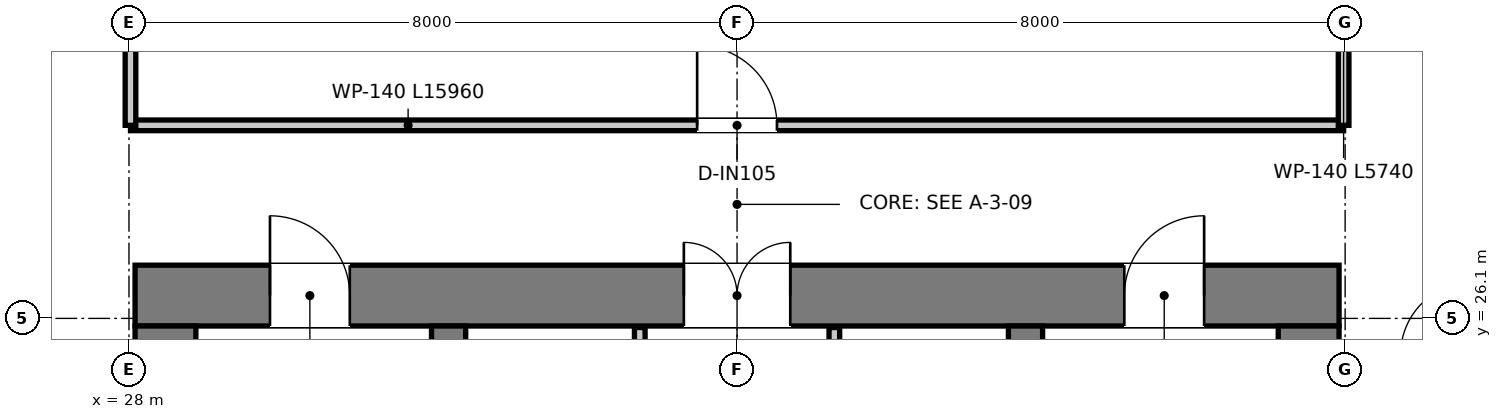
"""IFC4 building model, lengths in metres.
Left out: names, types, materials, properties, quantities, classifications, styles, units other than length and angle.
Written with IfcOpenShell. Run it as: python <this file> out.ifc"""

import sys

from ifc_helpers import new_model, si_unit, direction, frame, frame_2d, origin, place, context, subcontext, project, spatial, rectangle, extrude, element, fill, save


model = new_model("IFC4")
c1 = context("Model", 3, precision=1e-05, world=origin(), true_north=direction((0.0, 1.0)))
c2 = subcontext(c1, "Body", "Model", "MODEL_VIEW")
j1 = project(units=[si_unit("LENGTHUNIT", "METRE"), si_unit("PLANEANGLEUNIT", "RADIAN")], contexts=[c1])
p1 = place(None, origin())
s1 = spatial("IfcSite", under=j1, at=p1, CompositionType="ELEMENT")
p2 = place(p1, origin())
s2 = spatial("IfcBuilding", under=s1, at=p2, CompositionType="ELEMENT")
p3 = place(p2, frame((0.0, 0.0, 86.1)))
s3 = spatial("IfcBuildingStorey", under=s2, at=p3, CompositionType="ELEMENT", Elevation=86.1)
p4 = place(p3, frame((28.08, 26.4, 0.0), z_axis=(0.0, 0.0, 1.0), x_axis=(1.0, 0.0, 0.0)))
e1 = element("IfcWall", 1, at=p4, inside=s3, PredefinedType="SHEAR", context=c2, shape_type="SweptSolid", body=[
    extrude(rectangle(XDim=15.84, YDim=0.8, at=frame_2d((7.92, 0.0))), origin(), (0.0, 0.0, 1.0), 3.95),
])
p5 = place(p4, frame((7.22, 0.0, 0.0)))
e2 = element("IfcOpeningElement", 2, at=p5, cuts=e1, PredefinedType="OPENING", context=c2, shape_type="SweptSolid", body=[
    extrude(rectangle(XDim=1.4, YDim=2.2, at=frame_2d((0.7, 1.1))), frame((0.0, 0.41, 0.0), z_axis=(0.0, -1.0, 0.0), x_axis=(1.0, 0.0, 0.0)), (0.0, 0.0, 1.0), 0.82),
])
p6 = place(p4, frame((1.775, 0.0, 0.0)))
e3 = element("IfcOpeningElement", 3, at=p6, cuts=e1, PredefinedType="OPENING", context=c2, shape_type="SweptSolid", body=[
    extrude(rectangle(XDim=1.05, YDim=2.1, at=frame_2d((0.525, 1.05))), frame((0.0, 0.41, 0.0), z_axis=(0.0, -1.0, 0.0), x_axis=(1.0, 0.0, 0.0)), (0.0, 0.0, 1.0), 0.82),
])
p7 = place(p4, frame((13.015, 0.0, 0.0)))
e4 = element("IfcOpeningElement", 4, at=p7, cuts=e1, PredefinedType="OPENING", context=c2, shape_type="SweptSolid", body=[
    extrude(rectangle(XDim=1.05, YDim=2.1, at=frame_2d((0.525, 1.05))), frame((0.0, 0.41, 0.0), z_axis=(0.0, -1.0, 0.0), x_axis=(1.0, 0.0, 0.0)), (0.0, 0.0, 1.0), 0.82),
])
for number, where, z_axis, x_axis in (
    (5, (28.48, 11.3, 0.0), (0.0, 0.0, 1.0), (0.0, 1.0, 0.0)),
    (6, (43.52, 11.3, 0.0), (0.0, 0.0, 1.0), (0.0, 1.0, 0.0)),
):
    element("IfcWall", number, at=place(p3, frame(where, z_axis=z_axis, x_axis=x_axis)), inside=s3, PredefinedType="SHEAR", context=c2, shape_type="SweptSolid", body=[
        extrude(rectangle(XDim=14.7, YDim=0.8, at=frame_2d((7.35, 0.0))), origin(), (0.0, 0.0, 1.0), 3.95),
    ])
p8 = place(p3, frame((32.205, 13.22, 0.0), z_axis=(0.0, 0.0, 1.0), x_axis=(0.0, 1.0, 0.0)))
e7 = element("IfcWall", 7, at=p8, inside=s3, PredefinedType="SHEAR", context=c2, shape_type="SweptSolid", body=[
    extrude(rectangle(XDim=12.78, YDim=0.45, at=frame_2d((6.39, 0.0))), origin(), (0.0, 0.0, 1.0), 3.95),
])
p9 = place(p8, frame((10.58, 0.0, 0.0)))
e8 = element("IfcOpeningElement", 8, at=p9, cuts=e7, PredefinedType="OPENING", context=c2, shape_type="SweptSolid", body=[
    extrude(rectangle(XDim=1.1, YDim=2.15, at=frame_2d((0.55, 1.075))), frame((0.0, 0.235, 0.0), z_axis=(0.0, -1.0, 0.0), x_axis=(1.0, 0.0, 0.0)), (0.0, 0.0, 1.0), 0.47),
])
p10 = place(p3, frame((39.795, 13.22, 0.0), z_axis=(0.0, 0.0, 1.0), x_axis=(0.0, 1.0, 0.0)))
e9 = element("IfcWall", 9, at=p10, inside=s3, PredefinedType="SHEAR", context=c2, shape_type="SweptSolid", body=[
    extrude(rectangle(XDim=12.78, YDim=0.45, at=frame_2d((6.39, 0.0))), origin(), (0.0, 0.0, 1.0), 3.95),
])
p11 = place(p10, frame((10.58, 0.0, 0.0)))
e10 = element("IfcOpeningElement", 10, at=p11, cuts=e9, PredefinedType="OPENING", context=c2, shape_type="SweptSolid", body=[
    extrude(rectangle(XDim=1.1, YDim=2.15, at=frame_2d((0.55, 1.075))), frame((0.0, 0.235, 0.0), z_axis=(0.0, -1.0, 0.0), x_axis=(1.0, 0.0, 0.0)), (0.0, 0.0, 1.0), 0.47),
])
p12 = place(p3, frame((34.72, 20.2, 0.0), z_axis=(0.0, 0.0, 1.0), x_axis=(0.0, 1.0, 0.0)))
e11 = element("IfcWall", 11, at=p12, inside=s3, PredefinedType="PARTITIONING", context=c2, shape_type="SweptSolid", body=[
    extrude(rectangle(XDim=5.78, YDim=0.14, at=frame_2d((2.89, 0.0))), origin(), (0.0, 0.0, 1.0), 2.47),
])
p13 = place(p12, frame((1.05, 0.0, 0.0)))
e12 = element("IfcOpeningElement", 12, at=p13, cuts=e11, PredefinedType="OPENING", context=c2, shape_type="SweptSolid", body=[
    extrude(rectangle(XDim=0.9, YDim=2.1, at=frame_2d((0.45, 1.05))), frame((0.0, 0.08, 0.0), z_axis=(0.0, -1.0, 0.0), x_axis=(1.0, 0.0, 0.0)), (0.0, 0.0, 1.0), 0.16),
])
p14 = place(p3, frame((37.28, 20.2, 0.0), z_axis=(0.0, 0.0, 1.0), x_axis=(0.0, 1.0, 0.0)))
e13 = element("IfcWall", 13, at=p14, inside=s3, PredefinedType="PARTITIONING", context=c2, shape_type="SweptSolid", body=[
    extrude(rectangle(XDim=5.78, YDim=0.14, at=frame_2d((2.89, 0.0))), origin(), (0.0, 0.0, 1.0), 2.47),
])
p15 = place(p14, frame((0.95, 0.0, 0.0)))
e14 = element("IfcOpeningElement", 14, at=p15, cuts=e13, PredefinedType="OPENING", context=c2, shape_type="SweptSolid", body=[
    extrude(rectangle(XDim=1.1, YDim=2.15, at=frame_2d((0.55, 1.075))), frame((0.0, 0.08, 0.0), z_axis=(0.0, -1.0, 0.0), x_axis=(1.0, 0.0, 0.0)), (0.0, 0.0, 1.0), 0.16),
])
p16 = place(p3, frame((28.02, 28.64, 0.0), z_axis=(0.0, 0.0, 1.0), x_axis=(1.0, 0.0, 0.0)))
e15 = element("IfcWall", 15, at=p16, inside=s3, PredefinedType="PARTITIONING", context=c2, shape_type="SweptSolid", body=[
    extrude(rectangle(XDim=15.96, YDim=0.14, at=frame_2d((7.98, 0.0))), origin(), (0.0, 0.0, 1.0), 3.08),
])
p17 = place(p16, frame((7.455, 0.0, 0.0)))
e16 = element("IfcOpeningElement", 16, at=p17, cuts=e15, PredefinedType="OPENING", context=c2, shape_type="SweptSolid", body=[
    extrude(rectangle(XDim=1.05, YDim=2.15, at=frame_2d((0.525, 1.075))), frame((0.0, 0.08, 0.0), z_axis=(0.0, -1.0, 0.0), x_axis=(1.0, 0.0, 0.0)), (0.0, 0.0, 1.0), 0.16),
])
for number, where, z_axis, x_axis in (
    (17, (28.02, 28.64, 0.0), (0.0, 0.0, 1.0), (0.0, 1.0, 0.0)),
    (18, (43.98, 28.64, 0.0), (0.0, 0.0, 1.0), (0.0, 1.0, 0.0)),
):
    element("IfcWall", number, at=place(p3, frame(where, z_axis=z_axis, x_axis=x_axis)), inside=s3, PredefinedType="PARTITIONING", context=c2, shape_type="SweptSolid", body=[
        extrude(rectangle(XDim=5.74, YDim=0.14, at=frame_2d((2.87, 0.0))), origin(), (0.0, 0.0, 1.0), 3.27),
    ])
p18 = place(p5, origin())
e19 = element("IfcDoor", 19, at=p18, inside=s3, OperationType="DOUBLE_DOOR_SINGLE_SWING", PredefinedType="DOOR", context=c2, shape_type="SweptSolid", body=[
    extrude(rectangle(XDim=1.4, YDim=2.2, at=frame_2d((0.7, 1.1))), frame((0.0, 0.025, 0.0), z_axis=(0.0, -1.0, 0.0), x_axis=(1.0, 0.0, 0.0)), (0.0, 0.0, 1.0), 0.05),
])
fill(e2, e19)
p19 = place(p6, origin())
e20 = element("IfcDoor", 20, at=p19, inside=s3, OperationType="SINGLE_SWING_LEFT", PredefinedType="DOOR", context=c2, shape_type="SweptSolid", body=[
    extrude(rectangle(XDim=1.05, YDim=2.1, at=frame_2d((0.525, 1.05))), frame((0.0, 0.025, 0.0), z_axis=(0.0, -1.0, 0.0), x_axis=(1.0, 0.0, 0.0)), (0.0, 0.0, 1.0), 0.05),
])
fill(e3, e20)
p20 = place(p7, origin())
e21 = element("IfcDoor", 21, at=p20, inside=s3, OperationType="SINGLE_SWING_RIGHT", PredefinedType="DOOR", context=c2, shape_type="SweptSolid", body=[
    extrude(rectangle(XDim=1.05, YDim=2.1, at=frame_2d((0.525, 1.05))), frame((0.0, 0.025, 0.0), z_axis=(0.0, -1.0, 0.0), x_axis=(1.0, 0.0, 0.0)), (0.0, 0.0, 1.0), 0.05),
])
fill(e4, e21)
p21 = place(p17, origin())
e22 = element("IfcDoor", 22, at=p21, inside=s3, OperationType="SINGLE_SWING_LEFT", PredefinedType="DOOR", context=c2, shape_type="SweptSolid", body=[
    extrude(rectangle(XDim=1.05, YDim=2.15, at=frame_2d((0.525, 1.075))), frame((0.0, 0.025, 0.0), z_axis=(0.0, -1.0, 0.0), x_axis=(1.0, 0.0, 0.0)), (0.0, 0.0, 1.0), 0.05),
])
fill(e16, e22)
save(model, sys.argv[1])
